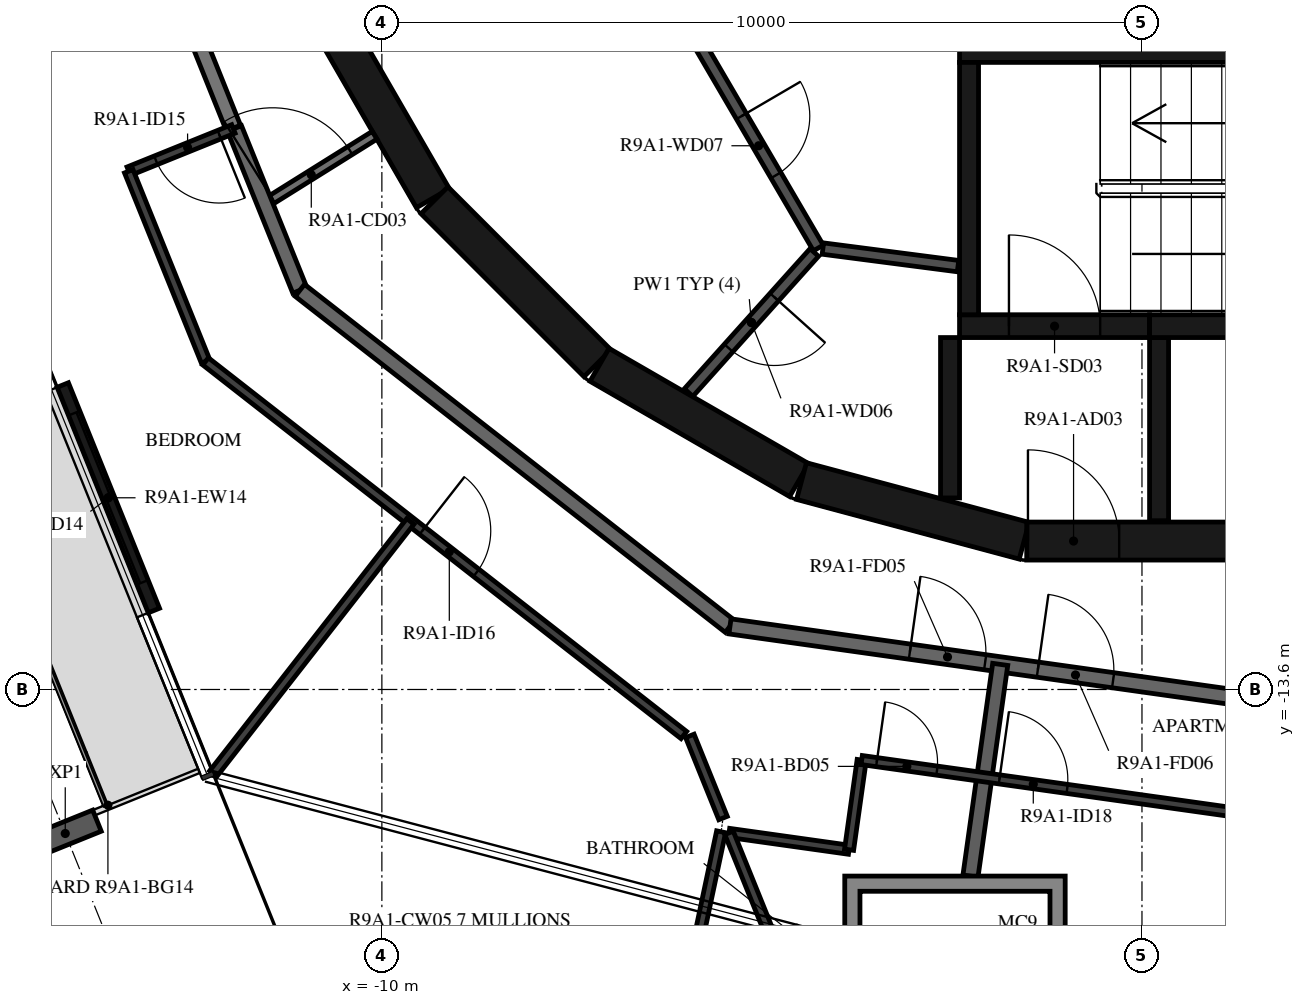
"""IFC4 building model, lengths in metres.
Left out: names, types, materials, properties, quantities, classifications, styles, units other than length and angle.
Written with IfcOpenShell. Run it as: python <this file> out.ifc"""

import sys

from ifc_helpers import new_model, si_unit, direction, frame, frame_2d, origin, origin_2d, place, context, subcontext, project, spatial, polyline, rectangle, i_section, outline, extrude, element, fill, save


model = new_model("IFC4")
c1 = context("Model", 3, precision=1e-05, world=origin(), true_north=direction((0.0, 1.0)))
c2 = subcontext(c1, "Body", "Model", "MODEL_VIEW")
j1 = project(units=[si_unit("LENGTHUNIT", "METRE"), si_unit("PLANEANGLEUNIT", "RADIAN")], contexts=[c1])
p1 = place(None, origin())
s1 = spatial("IfcSite", under=j1, at=p1, CompositionType="ELEMENT")
p2 = place(p1, origin())
s2 = spatial("IfcBuilding", under=s1, at=p2, CompositionType="ELEMENT")
p3 = place(p2, frame((0.0, 0.0, 336.5)))
s3 = spatial("IfcBuildingStorey", under=s2, at=p3, CompositionType="ELEMENT", Elevation=336.5)
p4 = place(p3, frame((-14.166, -15.495, -0.38), z_axis=(0.0, 0.0, 1.0), x_axis=(-0.374606892434, 0.927183733755, 0.0)))
e1 = element("IfcColumn", 1, at=p4, inside=s3, PredefinedType="COLUMN", context=c2, shape_type="SweptSolid", body=[
    extrude(i_section(OverallWidth=0.3, OverallDepth=0.9, WebThickness=0.019, FlangeThickness=0.035, FilletRadius=0.03, at=origin_2d()), origin(), (0.0, 0.0, 1.0), 3.5),
])
p5 = place(p3, frame((-14.198, -9.594, 0.0), z_axis=(0.0, 0.0, 1.0), x_axis=(0.374624519695, -0.927176611678, 0.0)))
e2 = element("IfcWall", 2, at=p5, inside=s3, PredefinedType="STANDARD", context=c2, shape_type="SweptSolid", body=[
    extrude(rectangle(XDim=3.2, YDim=0.16, at=frame_2d((1.6, 0.0))), origin(), (0.0, 0.0, 1.0), 3.12),
])
p6 = place(p5, frame((0.4, 0.0, 0.0)))
e3 = element("IfcOpeningElement", 3, at=p6, cuts=e2, PredefinedType="OPENING", context=c2, shape_type="SweptSolid", body=[
    extrude(rectangle(XDim=2.4, YDim=2.4, at=frame_2d((1.2, 1.2))), frame((0.0, 0.09, 0.0), z_axis=(0.0, -1.0, 0.0), x_axis=(1.0, 0.0, 0.0)), (0.0, 0.0, 1.0), 0.18),
])
p7 = place(p3, frame((-10.845, -4.51, 0.0), z_axis=(0.0, 0.0, 1.0), x_axis=(0.500087131594, -0.865975092491, 0.0)))
e4 = element("IfcWall", 4, at=p7, inside=s3, PredefinedType="SHEAR", context=c2, shape_type="SweptSolid", body=[
    extrude(rectangle(XDim=3.033, YDim=0.5, at=frame_2d((1.516, 0.0))), origin(), (0.0, 0.0, 1.0), 3.12),
])
p8 = place(p3, frame((-9.308, -7.164, 0.0), z_axis=(0.0, 0.0, 1.0), x_axis=(0.707106781187, -0.707106781187, 0.0)))
e5 = element("IfcWall", 5, at=p8, inside=s3, PredefinedType="SHEAR", context=c2, shape_type="SweptSolid", body=[
    extrude(rectangle(XDim=3.032, YDim=0.5, at=frame_2d((1.516, 0.0))), origin(), (0.0, 0.0, 1.0), 3.12),
])
for number, where, z_axis, x_axis in (
    (6, (-7.137, -9.329, 0.0), (0.0, 0.0, 1.0), (0.866, -0.5, 0.0)),
    (7, (-4.479, -10.858, 0.0), (0.0, 0.0, 1.0), (0.966, -0.259, 0.0)),
):
    element("IfcWall", number, at=place(p3, frame(where, z_axis=z_axis, x_axis=x_axis)), inside=s3, PredefinedType="SHEAR", context=c2, shape_type="SweptSolid", body=[
        extrude(rectangle(XDim=3.033, YDim=0.5, at=frame_2d((1.516, 0.0))), origin(), (0.0, 0.0, 1.0), 3.12),
    ])
p9 = place(p3, frame((-1.516, -11.647, 0.0), z_axis=(0.0, 0.0, 1.0), x_axis=(1.0, 0.0, 0.0)))
e8 = element("IfcWall", 8, at=p9, inside=s3, PredefinedType="SHEAR", context=c2, shape_type="SweptSolid", body=[
    extrude(rectangle(XDim=3.033, YDim=0.5, at=frame_2d((1.516, 0.0))), origin(), (0.0, 0.0, 1.0), 3.12),
])
p10 = place(p9, frame((0.016, 0.0, 0.0)))
e9 = element("IfcOpeningElement", 9, at=p10, cuts=e8, PredefinedType="OPENING", context=c2, shape_type="SweptSolid", body=[
    extrude(rectangle(XDim=1.2, YDim=2.1, at=frame_2d((0.6, 1.05))), frame((0.0, 0.26, 0.0), z_axis=(0.0, -1.0, 0.0), x_axis=(1.0, 0.0, 0.0)), (0.0, 0.0, 1.0), 0.52),
])
p11 = place(p3, frame((-2.275, -8.67, 0.0), z_axis=(0.0, 0.0, 1.0), x_axis=(0.0, 1.0, 0.0)))
e10 = element("IfcWall", 10, at=p11, inside=s3, PredefinedType="SHEAR", context=c2, shape_type="SweptSolid", body=[
    extrude(rectangle(XDim=3.32, YDim=0.25, at=frame_2d((1.66, 0.0))), origin(), (0.0, 0.0, 1.0), 3.12),
])
p12 = place(p3, frame((-2.4, -5.2, 0.0), z_axis=(0.0, 0.0, 1.0), x_axis=(1.0, 0.0, 0.0)))
e11 = element("IfcWall", 11, at=p12, inside=s3, PredefinedType="SHEAR", context=c2, shape_type="SweptSolid", body=[
    extrude(rectangle(XDim=7.05, YDim=0.3, at=frame_2d((3.525, 0.0))), origin(), (0.0, 0.0, 1.0), 3.12),
])
p13 = place(p3, frame((0.1, -8.82, 0.0), z_axis=(0.0, 0.0, 1.0), x_axis=(1.0, 0.0, 0.0)))
e12 = element("IfcWall", 12, at=p13, inside=s3, PredefinedType="SHEAR", context=c2, shape_type="SweptSolid", body=[
    extrude(rectangle(XDim=4.55, YDim=0.3, at=frame_2d((2.275, 0.0))), origin(), (0.0, 0.0, 1.0), 3.12),
])
p14 = place(p3, frame((-2.4, -8.82, 0.0), z_axis=(0.0, 0.0, 1.0), x_axis=(1.0, 0.0, 0.0)))
e13 = element("IfcWall", 13, at=p14, inside=s3, PredefinedType="SHEAR", context=c2, shape_type="SweptSolid", body=[
    extrude(rectangle(XDim=2.5, YDim=0.3, at=frame_2d((1.25, 0.0))), origin(), (0.0, 0.0, 1.0), 3.12),
])
p15 = place(p14, frame((0.65, 0.0, 0.0)))
e14 = element("IfcOpeningElement", 14, at=p15, cuts=e13, PredefinedType="OPENING", context=c2, shape_type="SweptSolid", body=[
    extrude(rectangle(XDim=1.2, YDim=2.1, at=frame_2d((0.6, 1.05))), frame((0.0, 0.16, 0.0), z_axis=(0.0, -1.0, 0.0), x_axis=(1.0, 0.0, 0.0)), (0.0, 0.0, 1.0), 0.32),
])
p16 = place(p3, frame((-2.525, -8.97, 0.0), z_axis=(0.0, 0.0, 1.0), x_axis=(0.0, -1.0, 0.0)))
e15 = element("IfcWall", 15, at=p16, inside=s3, PredefinedType="SHEAR", context=c2, shape_type="SweptSolid", body=[
    extrude(rectangle(XDim=2.11, YDim=0.25, at=frame_2d((1.055, 0.0))), origin(), (0.0, 0.0, 1.0), 3.12),
])
p17 = place(p3, frame((0.225, -8.97, 0.0), z_axis=(0.0, 0.0, 1.0), x_axis=(0.0, -1.0, 0.0)))
e16 = element("IfcWall", 16, at=p17, inside=s3, PredefinedType="SHEAR", context=c2, shape_type="SweptSolid", body=[
    extrude(rectangle(XDim=2.41, YDim=0.25, at=frame_2d((1.205, 0.0))), origin(), (0.0, 0.0, 1.0), 3.12),
])
p18 = place(p3, frame((-5.829, -5.102, 0.0), z_axis=(0.0, 0.0, 1.0), x_axis=(0.504480008384, -0.863423373057, 0.0)))
e17 = element("IfcWall", 17, at=p18, inside=s3, PredefinedType="PARTITIONING", context=c2, shape_type="SweptSolid", body=[
    extrude(rectangle(XDim=3.115, YDim=0.15, at=frame_2d((1.558, 0.0))), origin(), (0.0, 0.0, 1.0), 3.12),
])
p19 = place(p18, frame((1.107, 0.0, 0.0)))
e18 = element("IfcOpeningElement", 18, at=p19, cuts=e17, PredefinedType="OPENING", context=c2, shape_type="SweptSolid", body=[
    extrude(rectangle(XDim=0.9, YDim=2.1, at=frame_2d((0.45, 1.05))), frame((0.0, 0.085, 0.0), z_axis=(0.0, -1.0, 0.0), x_axis=(1.0, 0.0, 0.0)), (0.0, 0.0, 1.0), 0.17),
])
p20 = place(p3, frame((-4.311, -7.851, 0.0), z_axis=(0.0, 0.0, 1.0), x_axis=(-0.667869133096, -0.744278725383, 0.0)))
e19 = element("IfcWall", 19, at=p20, inside=s3, PredefinedType="PARTITIONING", context=c2, shape_type="SweptSolid", body=[
    extrude(rectangle(XDim=2.476, YDim=0.15, at=frame_2d((1.238, 0.0))), origin(), (0.0, 0.0, 1.0), 3.12),
])
p21 = place(p20, frame((0.788, 0.0, 0.0)))
e20 = element("IfcOpeningElement", 20, at=p21, cuts=e19, PredefinedType="OPENING", context=c2, shape_type="SweptSolid", body=[
    extrude(rectangle(XDim=0.9, YDim=2.1, at=frame_2d((0.45, 1.05))), frame((0.0, 0.085, 0.0), z_axis=(0.0, -1.0, 0.0), x_axis=(1.0, 0.0, 0.0)), (0.0, 0.0, 1.0), 0.17),
])
p22 = place(p3, frame((-4.198, -7.799, 0.0), z_axis=(0.0, 0.0, 1.0), x_axis=(0.991686747293, -0.128675542523, 0.0)))
e21 = element("IfcWall", 21, at=p22, inside=s3, PredefinedType="PARTITIONING", context=c2, shape_type="SweptSolid", body=[
    extrude(rectangle(XDim=1.793, YDim=0.15, at=frame_2d((0.896, 0.0))), origin(), (0.0, 0.0, 1.0), 3.12),
])
p23 = place(p3, frame((-11.539, -7.21, 0.0), z_axis=(0.0, 0.0, 1.0), x_axis=(0.848103039868, 0.529831325769, 0.0)))
e22 = element("IfcWall", 22, at=p23, inside=s3, PredefinedType="PARTITIONING", context=c2, shape_type="SweptSolid", body=[
    extrude(rectangle(XDim=1.702, YDim=0.12, at=frame_2d((0.851, 0.0))), origin(), (0.0, 0.0, 1.0), 3.12),
])
p24 = place(p23, frame((0.12, 0.0, 0.0)))
e23 = element("IfcOpeningElement", 23, at=p24, cuts=e22, PredefinedType="OPENING", context=c2, shape_type="SweptSolid", body=[
    extrude(rectangle(XDim=1.2, YDim=2.1, at=frame_2d((0.6, 1.05))), frame((0.0, 0.07, 0.0), z_axis=(0.0, -1.0, 0.0), x_axis=(1.0, 0.0, 0.0)), (0.0, 0.0, 1.0), 0.14),
])
p25 = place(p3, frame((-13.769, -1.691, 0.0), z_axis=(0.0, 0.0, 1.0), x_axis=(0.372720094028, -0.927943819155, 0.0)))
e24 = element("IfcWall", 24, at=p25, inside=s3, PredefinedType="STANDARD", context=c2, shape_type="SweptSolid", body=[
    extrude(rectangle(XDim=4.875, YDim=0.2, at=frame_2d((2.438, 0.0))), origin(), (0.0, 0.0, 1.0), 3.12),
])
p26 = place(p3, frame((-11.939, -6.22, 0.0), z_axis=(0.0, 0.0, 1.0), x_axis=(0.374651128394, -0.927165860024, 0.0)))
e25 = element("IfcWall", 25, at=p26, inside=s3, PredefinedType="STANDARD", context=c2, shape_type="SweptSolid", body=[
    extrude(rectangle(XDim=2.296, YDim=0.2, at=frame_2d((1.148, 0.0))), origin(), (0.0, 0.0, 1.0), 3.12),
])
p27 = place(p3, frame((-11.079, -8.349, 0.0), z_axis=(0.0, 0.0, 1.0), x_axis=(0.78800478687, -0.615669112324, 0.0)))
e26 = element("IfcWall", 26, at=p27, inside=s3, PredefinedType="STANDARD", context=c2, shape_type="SweptSolid", body=[
    extrude(rectangle(XDim=7.181, YDim=0.2, at=frame_2d((3.591, 0.0))), origin(), (0.0, 0.0, 1.0), 3.12),
])
p28 = place(p3, frame((-5.42, -12.77, 0.0), z_axis=(0.0, 0.0, 1.0), x_axis=(0.990270565508, -0.139155334385, 0.0)))
e27 = element("IfcWall", 27, at=p28, inside=s3, PredefinedType="STANDARD", context=c2, shape_type="SweptSolid", body=[
    extrude(rectangle(XDim=7.181, YDim=0.2, at=frame_2d((3.59, 0.0))), origin(), (0.0, 0.0, 1.0), 3.12),
])
p29 = place(p28, frame((2.39, 0.0, 0.0)))
e28 = element("IfcOpeningElement", 28, at=p29, cuts=e27, PredefinedType="OPENING", context=c2, shape_type="SweptSolid", body=[
    extrude(rectangle(XDim=1.0, YDim=2.1, at=frame_2d((0.5, 1.05))), frame((0.0, 0.11, 0.0), z_axis=(0.0, -1.0, 0.0), x_axis=(1.0, 0.0, 0.0)), (0.0, 0.0, 1.0), 0.22),
])
p30 = place(p28, frame((4.091, 0.0, 0.0)))
e29 = element("IfcOpeningElement", 29, at=p30, cuts=e27, PredefinedType="OPENING", context=c2, shape_type="SweptSolid", body=[
    extrude(rectangle(XDim=1.0, YDim=2.1, at=frame_2d((0.5, 1.05))), frame((0.0, 0.11, 0.0), z_axis=(0.0, -1.0, 0.0), x_axis=(1.0, 0.0, 0.0)), (0.0, 0.0, 1.0), 0.22),
])
p31 = place(p3, frame((-2.256, -16.055, 0.0), z_axis=(0.0, 0.0, 1.0), x_axis=(0.139148428478, 0.990271535919, 0.0)))
e30 = element("IfcWall", 30, at=p31, inside=s3, PredefinedType="STANDARD", context=c2, shape_type="SweptSolid", body=[
    extrude(rectangle(XDim=2.812, YDim=0.2, at=frame_2d((1.406, 0.0))), origin(), (0.0, 0.0, 1.0), 3.12),
])
p32 = place(p3, frame((-11.953, -6.225, 0.0), z_axis=(0.0, 0.0, 1.0), x_axis=(-0.927144096717, -0.374704982518, 0.0)))
e31 = element("IfcWall", 31, at=p32, inside=s3, PredefinedType="PARTITIONING", context=c2, shape_type="SweptSolid", body=[
    extrude(rectangle(XDim=1.485, YDim=0.12, at=frame_2d((0.742, 0.0))), origin(), (0.0, 0.0, 1.0), 3.12),
])
p33 = place(p32, frame((0.2, 0.0, 0.0)))
e32 = element("IfcOpeningElement", 32, at=p33, cuts=e31, PredefinedType="OPENING", context=c2, shape_type="SweptSolid", body=[
    extrude(rectangle(XDim=0.9, YDim=2.1, at=frame_2d((0.45, 1.05))), frame((0.0, 0.07, 0.0), z_axis=(0.0, -1.0, 0.0), x_axis=(1.0, 0.0, 0.0)), (0.0, 0.0, 1.0), 0.14),
])
p34 = place(p3, frame((-13.33, -6.782, 0.0), z_axis=(0.0, 0.0, 1.0), x_axis=(0.374602180132, -0.927185637637, 0.0)))
e33 = element("IfcWall", 33, at=p34, inside=s3, PredefinedType="PARTITIONING", context=c2, shape_type="SweptSolid", body=[
    extrude(rectangle(XDim=2.698, YDim=0.12, at=frame_2d((1.349, 0.0))), origin(), (0.0, 0.0, 1.0), 3.12),
])
p35 = place(p3, frame((-12.319, -9.283, 0.0), z_axis=(0.0, 0.0, 1.0), x_axis=(0.788000268464, -0.61567489546, 0.0)))
e34 = element("IfcWall", 34, at=p35, inside=s3, PredefinedType="PARTITIONING", context=c2, shape_type="SweptSolid", body=[
    extrude(rectangle(XDim=7.985, YDim=0.12, at=frame_2d((3.992, 0.0))), origin(), (0.0, 0.0, 1.0), 3.12),
])
p36 = place(p35, frame((3.619, 0.0, 0.0)))
e35 = element("IfcOpeningElement", 35, at=p36, cuts=e34, PredefinedType="OPENING", context=c2, shape_type="SweptSolid", body=[
    extrude(rectangle(XDim=0.9, YDim=2.1, at=frame_2d((0.45, 1.05))), frame((0.0, 0.07, 0.0), z_axis=(0.0, -1.0, 0.0), x_axis=(1.0, 0.0, 0.0)), (0.0, 0.0, 1.0), 0.14),
])
p37 = place(p3, frame((-5.948, -14.21, 0.0), z_axis=(0.0, 0.0, 1.0), x_axis=(0.374601530156, -0.927185900241, 0.0)))
e36 = element("IfcWall", 36, at=p37, inside=s3, PredefinedType="PARTITIONING", context=c2, shape_type="SweptSolid", body=[
    extrude(rectangle(XDim=1.166, YDim=0.12, at=frame_2d((0.583, 0.0))), origin(), (0.0, 0.0, 1.0), 3.12),
])
p38 = place(p3, frame((-5.433, -15.487, 0.0), z_axis=(0.0, 0.0, 1.0), x_axis=(0.990268451053, -0.139170380644, 0.0)))
e37 = element("IfcWall", 37, at=p38, inside=s3, PredefinedType="PARTITIONING", context=c2, shape_type="SweptSolid", body=[
    extrude(rectangle(XDim=1.595, YDim=0.12, at=frame_2d((0.797, 0.0))), origin(), (0.0, 0.0, 1.0), 3.12),
])
p39 = place(p3, frame((-3.854, -15.708, 0.0), z_axis=(0.0, 0.0, 1.0), x_axis=(0.139298773474, 0.99025039849, 0.0)))
e38 = element("IfcWall", 38, at=p39, inside=s3, PredefinedType="PARTITIONING", context=c2, shape_type="SweptSolid", body=[
    extrude(rectangle(XDim=1.192, YDim=0.12, at=frame_2d((0.596, 0.0))), origin(), (0.0, 0.0, 1.0), 3.12),
])
p40 = place(p3, frame((-3.688, -14.528, 0.0), z_axis=(0.0, 0.0, 1.0), x_axis=(0.990273698817, -0.139133035013, 0.0)))
e39 = element("IfcWall", 39, at=p40, inside=s3, PredefinedType="PARTITIONING", context=c2, shape_type="SweptSolid", body=[
    extrude(rectangle(XDim=4.945, YDim=0.12, at=frame_2d((2.472, 0.0))), origin(), (0.0, 0.0, 1.0), 3.12),
])
p41 = place(p40, frame((0.2, 0.0, 0.0)))
e40 = element("IfcOpeningElement", 40, at=p41, cuts=e39, PredefinedType="OPENING", context=c2, shape_type="SweptSolid", body=[
    extrude(rectangle(XDim=0.8, YDim=2.1, at=frame_2d((0.4, 1.05))), frame((0.0, 0.07, 0.0), z_axis=(0.0, -1.0, 0.0), x_axis=(1.0, 0.0, 0.0)), (0.0, 0.0, 1.0), 0.14),
])
p42 = place(p40, frame((1.83, 0.0, 0.0)))
e41 = element("IfcOpeningElement", 41, at=p42, cuts=e39, PredefinedType="OPENING", context=c2, shape_type="SweptSolid", body=[
    extrude(rectangle(XDim=0.9, YDim=2.1, at=frame_2d((0.45, 1.05))), frame((0.0, 0.07, 0.0), z_axis=(0.0, -1.0, 0.0), x_axis=(1.0, 0.0, 0.0)), (0.0, 0.0, 1.0), 0.14),
])
p43 = place(p3, frame((-12.219, -14.708, 0.0), z_axis=(0.0, 0.0, 1.0), x_axis=(0.615656413137, 0.788014708596, 0.0)))
e42 = element("IfcWall", 42, at=p43, inside=s3, PredefinedType="PARTITIONING", context=c2, shape_type="SweptSolid", body=[
    extrude(rectangle(XDim=4.213, YDim=0.12, at=frame_2d((2.106, 0.0))), origin(), (0.0, 0.0, 1.0), 3.12),
])
p44 = place(p3, frame((-7.305, -23.815, 0.0), z_axis=(0.0, 0.0, 1.0), x_axis=(0.207366409306, 0.978263345062, 0.0)))
e43 = element("IfcWall", 43, at=p44, inside=s3, PredefinedType="PARTITIONING", context=c2, shape_type="SweptSolid", body=[
    extrude(rectangle(XDim=8.529, YDim=0.12, at=frame_2d((4.264, 0.0))), origin(), (0.0, 0.0, 1.0), 3.12),
])
p45 = place(p44, frame((0.4, 0.0, 0.0)))
e44 = element("IfcOpeningElement", 44, at=p45, cuts=e43, PredefinedType="OPENING", context=c2, shape_type="SweptSolid", body=[
    extrude(rectangle(XDim=0.9, YDim=2.1, at=frame_2d((0.45, 1.05))), frame((0.0, 0.07, 0.0), z_axis=(0.0, -1.0, 0.0), x_axis=(1.0, 0.0, 0.0)), (0.0, 0.0, 1.0), 0.14),
])
p46 = place(p3, frame((-4.445, -17.93, 0.0), z_axis=(0.0, 0.0, 1.0), x_axis=(-0.374614676827, 0.927180588616, 0.0)))
e45 = element("IfcWall", 45, at=p46, inside=s3, PredefinedType="PARTITIONING", context=c2, shape_type="SweptSolid", body=[
    extrude(rectangle(XDim=2.635, YDim=0.12, at=frame_2d((1.318, 0.0))), origin(), (0.0, 0.0, 1.0), 3.12),
])
p47 = place(p3, origin())
e46 = element("IfcWall", 46, at=p47, inside=s3, PredefinedType="STANDARD", context=c2, shape_type="SweptSolid", body=[
    extrude(outline(polyline([(-1.01, -16.055), (-1.01, -18.955), (-3.91, -18.955), (-3.91, -16.055), (-1.01, -16.055)]), holes=[polyline([(-3.71, -18.755), (-1.21, -18.755), (-1.21, -16.255), (-3.71, -16.255), (-3.71, -18.755)])]), origin(), (0.0, 0.0, 1.0), 3.12),
])
p48 = place(p6, origin())
e47 = element("IfcDoor", 47, at=p48, inside=s3, OperationType="DOUBLE_DOOR_SLIDING", PredefinedType="DOOR", context=c2, shape_type="SweptSolid", body=[
    extrude(rectangle(XDim=2.4, YDim=2.4, at=frame_2d((1.2, 1.2))), frame((0.0, 0.025, 0.0), z_axis=(0.0, -1.0, 0.0), x_axis=(1.0, 0.0, 0.0)), (0.0, 0.0, 1.0), 0.05),
])
fill(e3, e47)
p49 = place(p15, origin())
e48 = element("IfcDoor", 48, at=p49, inside=s3, OperationType="SINGLE_SWING_LEFT", PredefinedType="DOOR", context=c2, shape_type="SweptSolid", body=[
    extrude(rectangle(XDim=1.2, YDim=2.1, at=frame_2d((0.6, 1.05))), frame((0.0, 0.025, 0.0), z_axis=(0.0, -1.0, 0.0), x_axis=(1.0, 0.0, 0.0)), (0.0, 0.0, 1.0), 0.05),
])
fill(e14, e48)
p50 = place(p10, origin())
e49 = element("IfcDoor", 49, at=p50, inside=s3, OperationType="SINGLE_SWING_RIGHT", PredefinedType="DOOR", context=c2, shape_type="SweptSolid", body=[
    extrude(rectangle(XDim=1.2, YDim=2.1, at=frame_2d((0.6, 1.05))), frame((0.0, 0.025, 0.0), z_axis=(0.0, -1.0, 0.0), x_axis=(1.0, 0.0, 0.0)), (0.0, 0.0, 1.0), 0.05),
])
fill(e9, e49)
p51 = place(p21, origin())
e50 = element("IfcDoor", 50, at=p51, inside=s3, OperationType="SINGLE_SWING_RIGHT", PredefinedType="DOOR", context=c2, shape_type="SweptSolid", body=[
    extrude(rectangle(XDim=0.9, YDim=2.1, at=frame_2d((0.45, 1.05))), frame((0.0, 0.025, 0.0), z_axis=(0.0, -1.0, 0.0), x_axis=(1.0, 0.0, 0.0)), (0.0, 0.0, 1.0), 0.05),
])
fill(e20, e50)
p52 = place(p19, origin())
e51 = element("IfcDoor", 51, at=p52, inside=s3, OperationType="SINGLE_SWING_LEFT", PredefinedType="DOOR", context=c2, shape_type="SweptSolid", body=[
    extrude(rectangle(XDim=0.9, YDim=2.1, at=frame_2d((0.45, 1.05))), frame((0.0, 0.025, 0.0), z_axis=(0.0, -1.0, 0.0), x_axis=(1.0, 0.0, 0.0)), (0.0, 0.0, 1.0), 0.05),
])
fill(e18, e51)
p53 = place(p29, origin())
e52 = element("IfcDoor", 52, at=p53, inside=s3, OperationType="SINGLE_SWING_RIGHT", PredefinedType="DOOR", context=c2, shape_type="SweptSolid", body=[
    extrude(rectangle(XDim=1.0, YDim=2.1, at=frame_2d((0.5, 1.05))), frame((0.0, 0.025, 0.0), z_axis=(0.0, -1.0, 0.0), x_axis=(1.0, 0.0, 0.0)), (0.0, 0.0, 1.0), 0.05),
])
fill(e28, e52)
p54 = place(p33, origin())
e53 = element("IfcDoor", 53, at=p54, inside=s3, OperationType="SINGLE_SWING_LEFT", PredefinedType="DOOR", context=c2, shape_type="SweptSolid", body=[
    extrude(rectangle(XDim=0.9, YDim=2.1, at=frame_2d((0.45, 1.05))), frame((0.0, 0.025, 0.0), z_axis=(0.0, -1.0, 0.0), x_axis=(1.0, 0.0, 0.0)), (0.0, 0.0, 1.0), 0.05),
])
fill(e32, e53)
p55 = place(p36, origin())
e54 = element("IfcDoor", 54, at=p55, inside=s3, OperationType="SINGLE_SWING_RIGHT", PredefinedType="DOOR", context=c2, shape_type="SweptSolid", body=[
    extrude(rectangle(XDim=0.9, YDim=2.1, at=frame_2d((0.45, 1.05))), frame((0.0, 0.025, 0.0), z_axis=(0.0, -1.0, 0.0), x_axis=(1.0, 0.0, 0.0)), (0.0, 0.0, 1.0), 0.05),
])
fill(e35, e54)
p56 = place(p41, origin())
e55 = element("IfcDoor", 55, at=p56, inside=s3, OperationType="SINGLE_SWING_RIGHT", PredefinedType="DOOR", context=c2, shape_type="SweptSolid", body=[
    extrude(rectangle(XDim=0.8, YDim=2.1, at=frame_2d((0.4, 1.05))), frame((0.0, 0.025, 0.0), z_axis=(0.0, -1.0, 0.0), x_axis=(1.0, 0.0, 0.0)), (0.0, 0.0, 1.0), 0.05),
])
fill(e40, e55)
p57 = place(p30, origin())
e56 = element("IfcDoor", 56, at=p57, inside=s3, OperationType="SINGLE_SWING_RIGHT", PredefinedType="DOOR", context=c2, shape_type="SweptSolid", body=[
    extrude(rectangle(XDim=1.0, YDim=2.1, at=frame_2d((0.5, 1.05))), frame((0.0, 0.025, 0.0), z_axis=(0.0, -1.0, 0.0), x_axis=(1.0, 0.0, 0.0)), (0.0, 0.0, 1.0), 0.05),
])
fill(e29, e56)
p58 = place(p42, origin())
e57 = element("IfcDoor", 57, at=p58, inside=s3, OperationType="SINGLE_SWING_RIGHT", PredefinedType="DOOR", context=c2, shape_type="SweptSolid", body=[
    extrude(rectangle(XDim=0.9, YDim=2.1, at=frame_2d((0.45, 1.05))), frame((0.0, 0.025, 0.0), z_axis=(0.0, -1.0, 0.0), x_axis=(1.0, 0.0, 0.0)), (0.0, 0.0, 1.0), 0.05),
])
fill(e41, e57)
p59 = place(p24, origin())
e58 = element("IfcDoor", 58, at=p59, inside=s3, OperationType="DOUBLE_DOOR_SINGLE_SWING", PredefinedType="DOOR", context=c2, shape_type="SweptSolid", body=[
    extrude(rectangle(XDim=1.2, YDim=2.1, at=frame_2d((0.6, 1.05))), frame((0.0, 0.025, 0.0), z_axis=(0.0, -1.0, 0.0), x_axis=(1.0, 0.0, 0.0)), (0.0, 0.0, 1.0), 0.05),
])
fill(e23, e58)
save(model, sys.argv[1])
